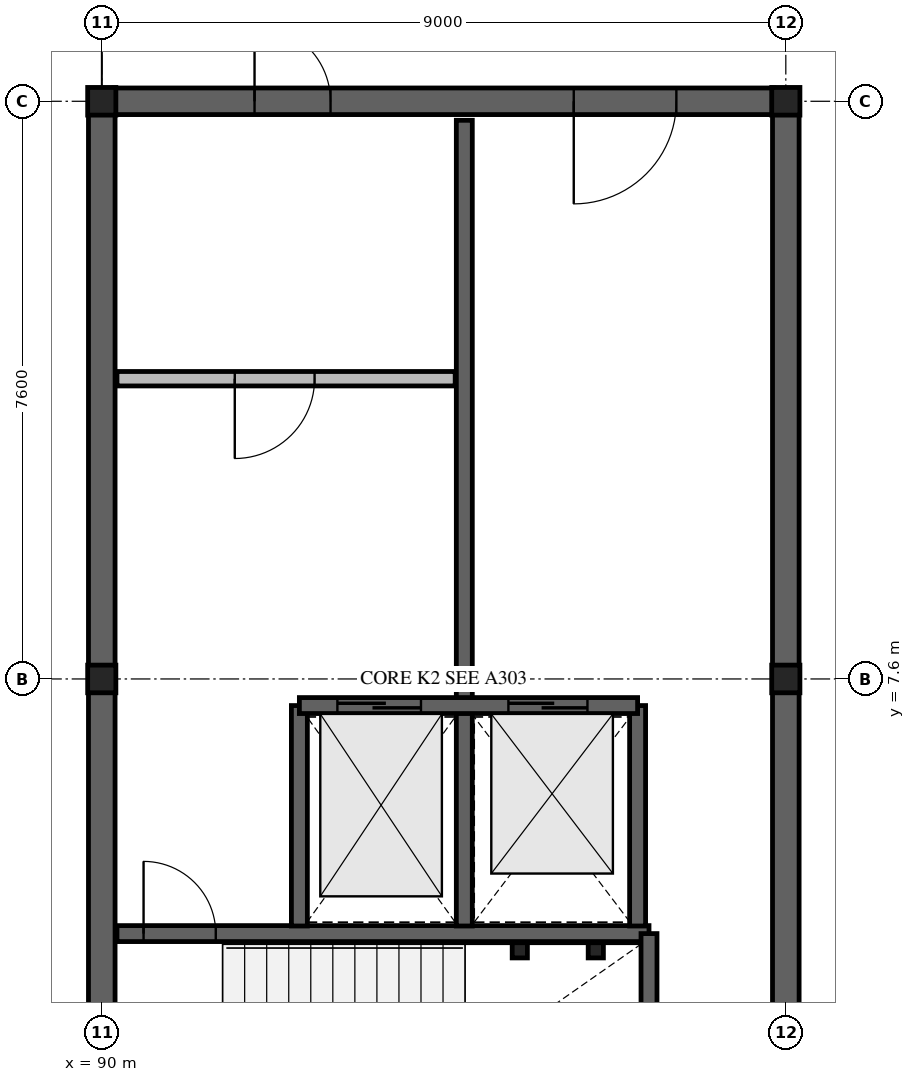
"""IFC4 building model, lengths in metres.
Left out: names, types, materials, properties, quantities, classifications, styles, units other than length and angle.
Written with IfcOpenShell. Run it as: python <this file> out.ifc"""

import sys

from ifc_helpers import new_model, si_unit, direction, frame, frame_2d, origin, origin_2d, place, context, subcontext, project, spatial, rectangle, hollow_rectangle, i_section, extrude, element, fill, save


model = new_model("IFC4")
c1 = context("Model", 3, precision=1e-05, world=origin(), true_north=direction((0.0, 1.0)))
c2 = subcontext(c1, "Body", "Model", "MODEL_VIEW")
j1 = project(units=[si_unit("LENGTHUNIT", "METRE"), si_unit("PLANEANGLEUNIT", "RADIAN")], contexts=[c1])
p1 = place(None, origin())
s1 = spatial("IfcSite", under=j1, at=p1, CompositionType="ELEMENT")
p2 = place(p1, origin())
s2 = spatial("IfcBuilding", under=s1, at=p2, CompositionType="ELEMENT")
p3 = place(p2, frame((0.0, 0.0, 5.04)))
s3 = spatial("IfcBuildingStorey", under=s2, at=p3, CompositionType="ELEMENT", Elevation=5.04)
for number, where, z_axis, x_axis in (
    (1, (90.0, 7.6, 0.0), (0.0, 0.0, 1.0), (1.0, 0.0, 0.0)),
    (2, (90.0, 15.2, 0.0), (0.0, 0.0, 1.0), (1.0, 0.0, 0.0)),
    (3, (99.0, 7.6, 0.0), (0.0, 0.0, 1.0), (1.0, 0.0, 0.0)),
    (4, (99.0, 15.2, 0.0), (0.0, 0.0, 1.0), (1.0, 0.0, 0.0)),
):
    element("IfcColumn", number, at=place(p3, frame(where, z_axis=z_axis, x_axis=x_axis)), inside=s3, PredefinedType="COLUMN", context=c2, shape_type="SweptSolid", body=[
        extrude(i_section(OverallWidth=0.371, OverallDepth=0.364, WebThickness=0.013, FlangeThickness=0.022, FilletRadius=0.018, at=origin_2d()), origin(), (0.0, 0.0, 1.0), 4.32),
    ])
p4 = place(p3, frame((90.16, 15.2, 0.0), z_axis=(0.0, 0.0, 1.0), x_axis=(1.0, 0.0, 0.0)))
e5 = element("IfcWall", 5, at=p4, inside=s3, PredefinedType="SHEAR", context=c2, shape_type="SweptSolid", body=[
    extrude(rectangle(XDim=8.68, YDim=0.35, at=frame_2d((4.34, 0.0))), origin(), (0.0, 0.0, 1.0), 4.04),
])
p5 = place(p4, frame((1.85, 0.0, 0.0)))
e6 = element("IfcOpeningElement", 6, at=p5, cuts=e5, PredefinedType="OPENING", context=c2, shape_type="SweptSolid", body=[
    extrude(rectangle(XDim=1.0, YDim=2.15, at=frame_2d((0.5, 1.075))), frame((0.0, 0.185, 0.0), z_axis=(0.0, -1.0, 0.0), x_axis=(1.0, 0.0, 0.0)), (0.0, 0.0, 1.0), 0.37),
])
p6 = place(p4, frame((6.05, 0.0, 0.0)))
e7 = element("IfcOpeningElement", 7, at=p6, cuts=e5, PredefinedType="OPENING", context=c2, shape_type="SweptSolid", body=[
    extrude(rectangle(XDim=1.35, YDim=2.18, at=frame_2d((0.675, 1.09))), frame((0.0, 0.185, 0.0), z_axis=(0.0, -1.0, 0.0), x_axis=(1.0, 0.0, 0.0)), (0.0, 0.0, 1.0), 0.37),
])
for number, where, z_axis, x_axis in (
    (8, (90.0, 0.16, 0.0), (0.0, 0.0, 1.0), (0.0, 1.0, 0.0)),
    (9, (99.0, 0.16, 0.0), (0.0, 0.0, 1.0), (0.0, 1.0, 0.0)),
):
    element("IfcWall", number, at=place(p3, frame(where, z_axis=z_axis, x_axis=x_axis)), inside=s3, PredefinedType="SHEAR", context=c2, shape_type="SweptSolid", body=[
        extrude(rectangle(XDim=14.88, YDim=0.35, at=frame_2d((7.44, 0.0))), origin(), (0.0, 0.0, 1.0), 4.04),
    ])
p7 = place(p3, frame((90.2, 4.25, 0.0), z_axis=(0.0, 0.0, 1.0), x_axis=(1.0, 0.0, 0.0)))
e10 = element("IfcWall", 10, at=p7, inside=s3, PredefinedType="SOLIDWALL", context=c2, shape_type="SweptSolid", body=[
    extrude(rectangle(XDim=7.0, YDim=0.21, at=frame_2d((3.5, 0.0))), origin(), (0.0, 0.0, 1.0), 4.04),
])
p8 = place(p7, frame((0.35, 0.0, 0.0)))
e11 = element("IfcOpeningElement", 11, at=p8, cuts=e10, PredefinedType="OPENING", context=c2, shape_type="SweptSolid", body=[
    extrude(rectangle(XDim=0.95, YDim=2.12, at=frame_2d((0.475, 1.06))), frame((0.0, 0.115, 0.0), z_axis=(0.0, -1.0, 0.0), x_axis=(1.0, 0.0, 0.0)), (0.0, 0.0, 1.0), 0.23),
])
p9 = place(p3, frame((97.2, 0.2, 0.0), z_axis=(0.0, 0.0, 1.0), x_axis=(0.0, 1.0, 0.0)))
e12 = element("IfcWall", 12, at=p9, inside=s3, PredefinedType="SOLIDWALL", context=c2, shape_type="SweptSolid", body=[
    extrude(rectangle(XDim=4.05, YDim=0.21, at=frame_2d((2.025, 0.0))), origin(), (0.0, 0.0, 1.0), 4.04),
])
p10 = place(p3, frame((92.6, 4.35, 0.0), z_axis=(0.0, 0.0, 1.0), x_axis=(0.0, 1.0, 0.0)))
e13 = element("IfcWall", 13, at=p10, inside=s3, PredefinedType="SOLIDWALL", context=c2, shape_type="SweptSolid", body=[
    extrude(rectangle(XDim=2.9, YDim=0.21, at=frame_2d((1.45, 0.0))), origin(), (0.0, 0.0, 1.0), 4.04),
])
p11 = place(p3, frame((94.77, 4.35, 0.0), z_axis=(0.0, 0.0, 1.0), x_axis=(0.0, 1.0, 0.0)))
e14 = element("IfcWall", 14, at=p11, inside=s3, PredefinedType="SOLIDWALL", context=c2, shape_type="SweptSolid", body=[
    extrude(rectangle(XDim=10.6, YDim=0.21, at=frame_2d((5.3, 0.0))), origin(), (0.0, 0.0, 1.0), 4.04),
])
p12 = place(p3, frame((97.05, 4.35, 0.0), z_axis=(0.0, 0.0, 1.0), x_axis=(0.0, 1.0, 0.0)))
e15 = element("IfcWall", 15, at=p12, inside=s3, PredefinedType="SOLIDWALL", context=c2, shape_type="SweptSolid", body=[
    extrude(rectangle(XDim=2.9, YDim=0.21, at=frame_2d((1.45, 0.0))), origin(), (0.0, 0.0, 1.0), 4.04),
])
p13 = place(p3, frame((92.6, 7.25, 0.0), z_axis=(0.0, 0.0, 1.0), x_axis=(1.0, 0.0, 0.0)))
e16 = element("IfcWall", 16, at=p13, inside=s3, PredefinedType="SOLIDWALL", context=c2, shape_type="SweptSolid", body=[
    extrude(rectangle(XDim=4.45, YDim=0.21, at=frame_2d((2.225, 0.0))), origin(), (0.0, 0.0, 1.0), 4.04),
])
p14 = place(p13, frame((0.5, 0.0, 0.0)))
e17 = element("IfcOpeningElement", 17, at=p14, cuts=e16, PredefinedType="OPENING", context=c2, shape_type="SweptSolid", body=[
    extrude(rectangle(XDim=1.1, YDim=2.14, at=frame_2d((0.55, 1.07))), frame((0.0, 0.115, 0.0), z_axis=(0.0, -1.0, 0.0), x_axis=(1.0, 0.0, 0.0)), (0.0, 0.0, 1.0), 0.23),
])
p15 = place(p13, frame((2.75, 0.0, 0.0)))
e18 = element("IfcOpeningElement", 18, at=p15, cuts=e16, PredefinedType="OPENING", context=c2, shape_type="SweptSolid", body=[
    extrude(rectangle(XDim=1.04, YDim=2.1, at=frame_2d((0.52, 1.05))), frame((0.0, 0.115, 0.0), z_axis=(0.0, -1.0, 0.0), x_axis=(1.0, 0.0, 0.0)), (0.0, 0.0, 1.0), 0.23),
])
p16 = place(p3, frame((90.2, 11.55, 0.0), z_axis=(0.0, 0.0, 1.0), x_axis=(1.0, 0.0, 0.0)))
e19 = element("IfcWall", 19, at=p16, inside=s3, PredefinedType="SOLIDWALL", context=c2, shape_type="SweptSolid", body=[
    extrude(rectangle(XDim=4.45, YDim=0.19, at=frame_2d((2.225, 0.0))), origin(), (0.0, 0.0, 1.0), 4.04),
])
p17 = place(p16, frame((1.55, 0.0, 0.0)))
e20 = element("IfcOpeningElement", 20, at=p17, cuts=e19, PredefinedType="OPENING", context=c2, shape_type="SweptSolid", body=[
    extrude(rectangle(XDim=1.05, YDim=2.12, at=frame_2d((0.525, 1.06))), frame((0.0, 0.105, 0.0), z_axis=(0.0, -1.0, 0.0), x_axis=(1.0, 0.0, 0.0)), (0.0, 0.0, 1.0), 0.21),
])
for number, where, z_axis, x_axis in (
    (21, (95.5, 4.03, 0.0), (0.0, 0.0, 1.0), (1.0, 0.0, 0.0)),
    (22, (96.5, 4.03, 0.0), (0.0, 0.0, 1.0), (1.0, 0.0, 0.0)),
):
    element("IfcColumn", number, at=place(p3, frame(where, z_axis=z_axis, x_axis=x_axis)), inside=s3, PredefinedType="COLUMN", context=c2, shape_type="SweptSolid", body=[
        extrude(hollow_rectangle(XDim=0.2, YDim=0.2, WallThickness=0.012, at=origin_2d()), origin(), (0.0, 0.0, 1.0), 4.32),
    ])
p18 = place(p8, origin())
e23 = element("IfcDoor", 23, at=p18, inside=s3, OperationType="SINGLE_SWING_LEFT", PredefinedType="DOOR", context=c2, shape_type="SweptSolid", body=[
    extrude(rectangle(XDim=0.95, YDim=2.12, at=frame_2d((0.475, 1.06))), frame((0.0, 0.025, 0.0), z_axis=(0.0, -1.0, 0.0), x_axis=(1.0, 0.0, 0.0)), (0.0, 0.0, 1.0), 0.05),
])
fill(e11, e23)
p19 = place(p14, origin())
e24 = element("IfcDoor", 24, at=p19, inside=s3, OperationType="SLIDING_TO_LEFT", PredefinedType="DOOR", context=c2, shape_type="SweptSolid", body=[
    extrude(rectangle(XDim=1.1, YDim=2.14, at=frame_2d((0.55, 1.07))), frame((0.0, 0.025, 0.0), z_axis=(0.0, -1.0, 0.0), x_axis=(1.0, 0.0, 0.0)), (0.0, 0.0, 1.0), 0.05),
])
fill(e17, e24)
p20 = place(p15, origin())
e25 = element("IfcDoor", 25, at=p20, inside=s3, OperationType="SLIDING_TO_LEFT", PredefinedType="DOOR", context=c2, shape_type="SweptSolid", body=[
    extrude(rectangle(XDim=1.04, YDim=2.1, at=frame_2d((0.52, 1.05))), frame((0.0, 0.025, 0.0), z_axis=(0.0, -1.0, 0.0), x_axis=(1.0, 0.0, 0.0)), (0.0, 0.0, 1.0), 0.05),
])
fill(e18, e25)
p21 = place(p17, origin())
e26 = element("IfcDoor", 26, at=p21, inside=s3, OperationType="SINGLE_SWING_RIGHT", PredefinedType="DOOR", context=c2, shape_type="SweptSolid", body=[
    extrude(rectangle(XDim=1.05, YDim=2.12, at=frame_2d((0.525, 1.06))), frame((0.0, 0.025, 0.0), z_axis=(0.0, -1.0, 0.0), x_axis=(1.0, 0.0, 0.0)), (0.0, 0.0, 1.0), 0.05),
])
fill(e20, e26)
p22 = place(p5, origin())
e27 = element("IfcDoor", 27, at=p22, inside=s3, OperationType="SINGLE_SWING_LEFT", PredefinedType="DOOR", context=c2, shape_type="SweptSolid", body=[
    extrude(rectangle(XDim=1.0, YDim=2.15, at=frame_2d((0.5, 1.075))), frame((0.0, 0.025, 0.0), z_axis=(0.0, -1.0, 0.0), x_axis=(1.0, 0.0, 0.0)), (0.0, 0.0, 1.0), 0.05),
])
fill(e6, e27)
p23 = place(p6, origin())
e28 = element("IfcDoor", 28, at=p23, inside=s3, OperationType="SINGLE_SWING_RIGHT", PredefinedType="DOOR", context=c2, shape_type="SweptSolid", body=[
    extrude(rectangle(XDim=1.35, YDim=2.18, at=frame_2d((0.675, 1.09))), frame((0.0, 0.025, 0.0), z_axis=(0.0, -1.0, 0.0), x_axis=(1.0, 0.0, 0.0)), (0.0, 0.0, 1.0), 0.05),
])
fill(e7, e28)
save(model, sys.argv[1])
